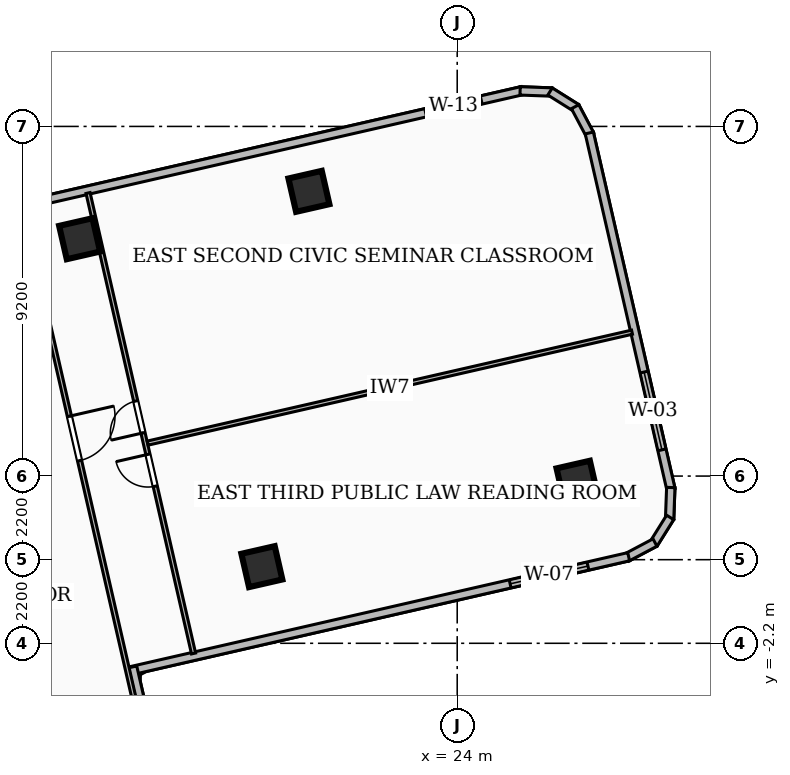
"""IFC4 building model, lengths in metres.
Left out: names, types, materials, properties, quantities, classifications, styles, units other than length and angle.
Written with IfcOpenShell. Run it as: python <this file> out.ifc"""

import sys

from ifc_helpers import new_model, si_unit, direction, frame, frame_2d, origin, origin_2d, place, context, subcontext, project, spatial, rectangle, extrude, element, fill, save


model = new_model("IFC4")
c1 = context("Model", 3, precision=1e-05, world=origin(), true_north=direction((0.0, 1.0)))
c2 = subcontext(c1, "Body", "Model", "MODEL_VIEW")
j1 = project(units=[si_unit("LENGTHUNIT", "METRE"), si_unit("PLANEANGLEUNIT", "RADIAN")], contexts=[c1])
p1 = place(None, origin())
s1 = spatial("IfcSite", under=j1, at=p1, CompositionType="ELEMENT")
p2 = place(p1, origin())
s2 = spatial("IfcBuilding", under=s1, at=p2, CompositionType="ELEMENT")
p3 = place(p2, frame((0.0, 0.0, 119.88)))
s3 = spatial("IfcBuildingStorey", under=s2, at=p3, CompositionType="ELEMENT", Elevation=119.88)
for number, where, z_axis, x_axis in (
    (1, (18.86, -0.183, 0.0), (0.0, 0.0, 1.0), (0.975, 0.223, 0.0)),
    (2, (14.064, 8.445, 0.0), (0.0, 0.0, 1.0), (0.975, 0.223, 0.0)),
    (3, (27.153, 2.064, 0.0), (0.0, 0.0, 1.0), (0.975, 0.223, 0.0)),
    (4, (20.098, 9.692, 0.0), (0.0, 0.0, 1.0), (0.975, 0.223, 0.0)),
):
    element("IfcColumn", number, at=place(p3, frame(where, z_axis=z_axis, x_axis=x_axis)), inside=s3, PredefinedType="COLUMN", context=c2, shape_type="SweptSolid", body=[
        extrude(rectangle(XDim=0.9, YDim=0.9, at=origin_2d()), origin(), (0.0, 0.0, 1.0), 3.6),
    ])
p4 = place(p3, frame((12.585, 9.335, 0.0), z_axis=(0.0, 0.0, 1.0), x_axis=(0.974754036658, 0.223281365141, 0.0)))
e5 = element("IfcWall", 5, at=p4, inside=s3, PredefinedType="SOLIDWALL", context=c2, shape_type="SweptSolid", body=[
    extrude(rectangle(XDim=13.459, YDim=0.22, at=frame_2d((6.729, 0.0))), origin(), (0.0, 0.0, 1.0), 3.34),
])
p5 = place(p4, frame((10.859, 0.0, 0.85)))
e6 = element("IfcOpeningElement", 6, at=p5, cuts=e5, PredefinedType="OPENING", context=c2, shape_type="SweptSolid", body=[
    extrude(rectangle(XDim=1.5, YDim=1.8, at=frame_2d((0.75, 0.9))), frame((0.0, 0.12, 0.0), z_axis=(0.0, -1.0, 0.0), x_axis=(1.0, 0.0, 0.0)), (0.0, 0.0, 1.0), 0.24),
])
p6 = place(p3, frame((25.655, 12.335, 0.0), z_axis=(0.0, 0.0, 1.0), x_axis=(0.999352376715, -0.035983706773, 0.0)))
e7 = element("IfcWall", 7, at=p6, inside=s3, PredefinedType="SOLIDWALL", context=c2, shape_type="SweptSolid", body=[
    extrude(rectangle(XDim=0.834, YDim=0.22, at=frame_2d((0.417, 0.0))), origin(), (0.0, 0.0, 1.0), 3.34),
])
p7 = place(p3, frame((26.443, 12.319, 0.0), z_axis=(0.0, 0.0, 1.0), x_axis=(0.846889988853, -0.531768132536, 0.0)))
e8 = element("IfcWall", 8, at=p7, inside=s3, PredefinedType="SOLIDWALL", context=c2, shape_type="SweptSolid", body=[
    extrude(rectangle(XDim=0.818, YDim=0.22, at=frame_2d((0.409, 0.0))), origin(), (0.0, 0.0, 1.0), 3.34),
])
p8 = place(p3, frame((27.103, 11.919, 0.0), z_axis=(0.0, 0.0, 1.0), x_axis=(0.468506090516, -0.883460266876, 0.0)))
e9 = element("IfcWall", 9, at=p8, inside=s3, PredefinedType="SOLIDWALL", context=c2, shape_type="SweptSolid", body=[
    extrude(rectangle(XDim=0.834, YDim=0.22, at=frame_2d((0.417, 0.0))), origin(), (0.0, 0.0, 1.0), 3.34),
])
p9 = place(p3, frame((27.476, 11.228, 0.0), z_axis=(0.0, 0.0, 1.0), x_axis=(0.223358074049, -0.974736462208, 0.0)))
e10 = element("IfcWall", 10, at=p9, inside=s3, PredefinedType="SOLIDWALL", context=c2, shape_type="SweptSolid", body=[
    extrude(rectangle(XDim=9.621, YDim=0.22, at=frame_2d((4.811, 0.0))), origin(), (0.0, 0.0, 1.0), 3.34),
])
p10 = place(p9, frame((6.454, 0.0, 0.85)))
e11 = element("IfcOpeningElement", 11, at=p10, cuts=e10, PredefinedType="OPENING", context=c2, shape_type="SweptSolid", body=[
    extrude(rectangle(XDim=2.1, YDim=2.0, at=frame_2d((1.05, 1.0))), frame((0.0, 0.12, 0.0), z_axis=(0.0, -1.0, 0.0), x_axis=(1.0, 0.0, 0.0)), (0.0, 0.0, 1.0), 0.24),
])
p11 = place(p3, frame((29.62, 1.899, 0.0), z_axis=(0.0, 0.0, 1.0), x_axis=(-0.037195813461, -0.999307996296, 0.0)))
e12 = element("IfcWall", 12, at=p11, inside=s3, PredefinedType="SOLIDWALL", context=c2, shape_type="SweptSolid", body=[
    extrude(rectangle(XDim=0.833, YDim=0.22, at=frame_2d((0.417, 0.0))), origin(), (0.0, 0.0, 1.0), 3.34),
])
p12 = place(p3, frame((29.603, 1.112, 0.0), z_axis=(0.0, 0.0, 1.0), x_axis=(-0.530240177466, -0.847847482865, 0.0)))
e13 = element("IfcWall", 13, at=p12, inside=s3, PredefinedType="SOLIDWALL", context=c2, shape_type="SweptSolid", body=[
    extrude(rectangle(XDim=0.819, YDim=0.22, at=frame_2d((0.409, 0.0))), origin(), (0.0, 0.0, 1.0), 3.34),
])
p13 = place(p3, frame((29.204, 0.451, 0.0), z_axis=(0.0, 0.0, 1.0), x_axis=(-0.883716798585, -0.468022029287, 0.0)))
e14 = element("IfcWall", 14, at=p13, inside=s3, PredefinedType="SOLIDWALL", context=c2, shape_type="SweptSolid", body=[
    extrude(rectangle(XDim=0.835, YDim=0.22, at=frame_2d((0.417, 0.0))), origin(), (0.0, 0.0, 1.0), 3.34),
])
p14 = place(p3, frame((28.512, 0.078, 0.0), z_axis=(0.0, 0.0, 1.0), x_axis=(-0.974753462872, -0.223283870038, 0.0)))
e15 = element("IfcWall", 15, at=p14, inside=s3, PredefinedType="SOLIDWALL", context=c2, shape_type="SweptSolid", body=[
    extrude(rectangle(XDim=13.458, YDim=0.22, at=frame_2d((6.729, 0.0))), origin(), (0.0, 0.0, 1.0), 3.34),
])
p15 = place(p14, frame((1.1, 0.0, 0.85)))
e16 = element("IfcOpeningElement", 16, at=p15, cuts=e15, PredefinedType="OPENING", context=c2, shape_type="SweptSolid", body=[
    extrude(rectangle(XDim=2.1, YDim=1.8, at=frame_2d((1.05, 0.9))), frame((0.0, 0.12, 0.0), z_axis=(0.0, -1.0, 0.0), x_axis=(1.0, 0.0, 0.0)), (0.0, 0.0, 1.0), 0.24),
])
p16 = place(p3, frame((15.46, -2.821, 0.0), z_axis=(0.0, 0.0, 1.0), x_axis=(0.223278912438, -0.974754598481, 0.0)))
e17 = element("IfcWall", 17, at=p16, inside=s3, PredefinedType="SOLIDWALL", context=c2, shape_type="SweptSolid", body=[
    extrude(rectangle(XDim=6.759, YDim=0.22, at=frame_2d((3.379, 0.0))), origin(), (0.0, 0.0, 1.0), 3.34),
])
p17 = place(p3, frame((11.692, 12.957, 0.0), z_axis=(0.0, 0.0, 1.0), x_axis=(0.223262093598, -0.97475845088, 0.0)))
e18 = element("IfcWall", 18, at=p17, inside=s3, PredefinedType="PARTITIONING", context=c2, shape_type="SweptSolid", body=[
    extrude(rectangle(XDim=20.04, YDim=0.11, at=frame_2d((10.02, 0.0))), origin(), (0.0, 0.0, 1.0), 2.57),
])
p18 = place(p17, frame((9.42, 0.0, 0.0)))
e19 = element("IfcOpeningElement", 19, at=p18, cuts=e18, PredefinedType="OPENING", context=c2, shape_type="SweptSolid", body=[
    extrude(rectangle(XDim=1.2, YDim=2.1, at=frame_2d((0.6, 1.05))), frame((0.0, 0.065, 0.0), z_axis=(0.0, -1.0, 0.0), x_axis=(1.0, 0.0, 0.0)), (0.0, 0.0, 1.0), 0.13),
])
p19 = place(p3, frame((15.855, 3.067, 0.0), z_axis=(0.0, 0.0, 1.0), x_axis=(0.974758398925, 0.223262320434, 0.0)))
e20 = element("IfcWall", 20, at=p19, inside=s3, PredefinedType="PARTITIONING", context=c2, shape_type="SweptSolid", body=[
    extrude(rectangle(XDim=13.075, YDim=0.11, at=frame_2d((6.538, 0.0))), origin(), (0.0, 0.0, 1.0), 2.72),
])
p20 = place(p3, frame((17.062, -2.468, 0.0), z_axis=(0.0, 0.0, 1.0), x_axis=(-0.223341555051, 0.974740247341, 0.0)))
e21 = element("IfcWall", 21, at=p20, inside=s3, PredefinedType="PARTITIONING", context=c2, shape_type="SweptSolid", body=[
    extrude(rectangle(XDim=12.43, YDim=0.11, at=frame_2d((6.215, 0.0))), origin(), (0.0, 0.0, 1.0), 2.57),
])
p21 = place(p20, frame((4.515, 0.0, 0.0)))
e22 = element("IfcOpeningElement", 22, at=p21, cuts=e21, PredefinedType="OPENING", context=c2, shape_type="SweptSolid", body=[
    extrude(rectangle(XDim=0.86, YDim=2.04, at=frame_2d((0.43, 1.02))), frame((0.0, 0.065, 0.0), z_axis=(0.0, -1.0, 0.0), x_axis=(1.0, 0.0, 0.0)), (0.0, 0.0, 1.0), 0.13),
])
p22 = place(p20, frame((5.955, 0.0, 0.0)))
e23 = element("IfcOpeningElement", 23, at=p22, cuts=e21, PredefinedType="OPENING", context=c2, shape_type="SweptSolid", body=[
    extrude(rectangle(XDim=0.86, YDim=2.04, at=frame_2d((0.43, 1.02))), frame((0.0, 0.065, 0.0), z_axis=(0.0, -1.0, 0.0), x_axis=(1.0, 0.0, 0.0)), (0.0, 0.0, 1.0), 0.13),
])
p23 = place(p5, origin())
e24 = element("IfcWindow", 24, at=p23, inside=s3, PartitioningType="SINGLE_PANEL", PredefinedType="WINDOW", context=c2, shape_type="SweptSolid", body=[
    extrude(rectangle(XDim=1.5, YDim=1.8, at=frame_2d((0.75, 0.9))), frame((0.0, 0.03, 0.0), z_axis=(0.0, -1.0, 0.0), x_axis=(1.0, 0.0, 0.0)), (0.0, 0.0, 1.0), 0.06),
])
fill(e6, e24)
p24 = place(p10, origin())
e25 = element("IfcWindow", 25, at=p24, inside=s3, PartitioningType="SINGLE_PANEL", PredefinedType="WINDOW", context=c2, shape_type="SweptSolid", body=[
    extrude(rectangle(XDim=2.1, YDim=2.0, at=frame_2d((1.05, 1.0))), frame((0.0, 0.03, 0.0), z_axis=(0.0, -1.0, 0.0), x_axis=(1.0, 0.0, 0.0)), (0.0, 0.0, 1.0), 0.06),
])
fill(e11, e25)
p25 = place(p15, origin())
e26 = element("IfcWindow", 26, at=p25, inside=s3, PartitioningType="SINGLE_PANEL", PredefinedType="WINDOW", context=c2, shape_type="SweptSolid", body=[
    extrude(rectangle(XDim=2.1, YDim=1.8, at=frame_2d((1.05, 0.9))), frame((0.0, 0.03, 0.0), z_axis=(0.0, -1.0, 0.0), x_axis=(1.0, 0.0, 0.0)), (0.0, 0.0, 1.0), 0.06),
])
fill(e16, e26)
p26 = place(p18, origin())
e27 = element("IfcDoor", 27, at=p26, inside=s3, OperationType="SINGLE_SWING_LEFT", PredefinedType="DOOR", context=c2, shape_type="SweptSolid", body=[
    extrude(rectangle(XDim=1.2, YDim=2.1, at=frame_2d((0.6, 1.05))), frame((0.0, 0.025, 0.0), z_axis=(0.0, -1.0, 0.0), x_axis=(1.0, 0.0, 0.0)), (0.0, 0.0, 1.0), 0.05),
])
fill(e19, e27)
p27 = place(p21, origin())
e28 = element("IfcDoor", 28, at=p27, inside=s3, OperationType="SINGLE_SWING_RIGHT", PredefinedType="DOOR", context=c2, shape_type="SweptSolid", body=[
    extrude(rectangle(XDim=0.86, YDim=2.04, at=frame_2d((0.43, 1.02))), frame((0.0, 0.025, 0.0), z_axis=(0.0, -1.0, 0.0), x_axis=(1.0, 0.0, 0.0)), (0.0, 0.0, 1.0), 0.05),
])
fill(e22, e28)
p28 = place(p22, origin())
e29 = element("IfcDoor", 29, at=p28, inside=s3, OperationType="SINGLE_SWING_LEFT", PredefinedType="DOOR", context=c2, shape_type="SweptSolid", body=[
    extrude(rectangle(XDim=0.86, YDim=2.04, at=frame_2d((0.43, 1.02))), frame((0.0, 0.025, 0.0), z_axis=(0.0, -1.0, 0.0), x_axis=(1.0, 0.0, 0.0)), (0.0, 0.0, 1.0), 0.05),
])
fill(e23, e29)
save(model, sys.argv[1])
